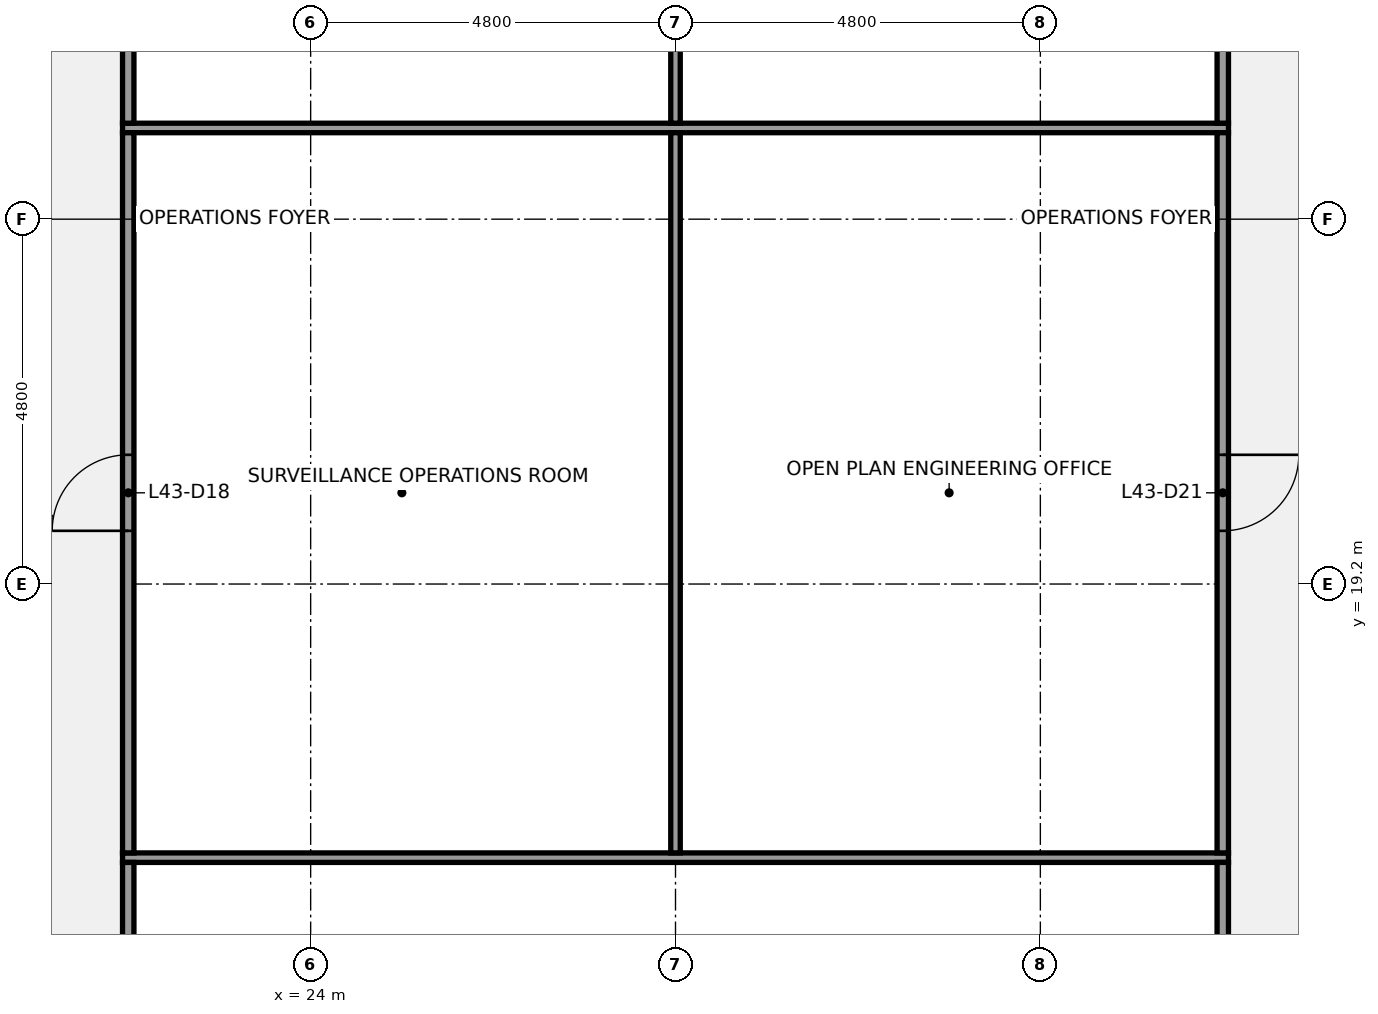
"""IFC4 building model, lengths in metres.
Left out: names, types, materials, properties, quantities, classifications, styles, units other than length and angle.
Written with IfcOpenShell. Run it as: python <this file> out.ifc"""

import sys

from ifc_helpers import new_model, si_unit, direction, frame, frame_2d, origin, place, context, subcontext, project, spatial, rectangle, extrude, element, fill, save


model = new_model("IFC4")
c1 = context("Model", 3, precision=1e-05, world=origin(), true_north=direction((0.0, 1.0)))
c2 = subcontext(c1, "Body", "Model", "MODEL_VIEW")
j1 = project(units=[si_unit("LENGTHUNIT", "METRE"), si_unit("PLANEANGLEUNIT", "RADIAN")], contexts=[c1])
p1 = place(None, origin())
s1 = spatial("IfcSite", under=j1, at=p1, CompositionType="ELEMENT")
p2 = place(p1, origin())
s2 = spatial("IfcBuilding", under=s1, at=p2, CompositionType="ELEMENT")
p3 = place(p2, frame((0.0, 0.0, 201.2)))
s3 = spatial("IfcBuildingStorey", under=s2, at=p3, CompositionType="ELEMENT", Elevation=201.2)
for number, where, z_axis, x_axis in (
    (1, (21.525, 15.6, 0.0), (0.0, 0.0, 1.0), (1.0, 0.0, 0.0)),
    (2, (21.525, 25.2, 0.0), (0.0, 0.0, 1.0), (1.0, 0.0, 0.0)),
):
    element("IfcWall", number, at=place(p3, frame(where, z_axis=z_axis, x_axis=x_axis)), inside=s3, PredefinedType="PARTITIONING", context=c2, shape_type="SweptSolid", body=[
        extrude(rectangle(XDim=14.55, YDim=0.125, at=frame_2d((7.275, 0.0))), origin(), (0.0, 0.0, 1.0), 2.87),
    ])
p4 = place(p3, frame((21.6, 10.863, 0.0), z_axis=(0.0, 0.0, 1.0), x_axis=(0.0, 1.0, 0.0)))
e3 = element("IfcWall", 3, at=p4, inside=s3, PredefinedType="PARTITIONING", context=c2, shape_type="SweptSolid", body=[
    extrude(rectangle(XDim=4.675, YDim=0.15, at=frame_2d((2.337, 0.0))), origin(), (0.0, 0.0, 1.0), 2.87),
])
p5 = place(p4, frame((1.837, 0.0, 0.0)))
e4 = element("IfcOpeningElement", 4, at=p5, cuts=e3, PredefinedType="OPENING", context=c2, shape_type="SweptSolid", body=[
    extrude(rectangle(XDim=1.0, YDim=2.1, at=frame_2d((0.5, 1.05))), frame((0.0, 0.085, 0.0), z_axis=(0.0, -1.0, 0.0), x_axis=(1.0, 0.0, 0.0)), (0.0, 0.0, 1.0), 0.17),
])
p6 = place(p3, frame((21.6, 15.663, 0.0), z_axis=(0.0, 0.0, 1.0), x_axis=(0.0, 1.0, 0.0)))
e5 = element("IfcWall", 5, at=p6, inside=s3, PredefinedType="PARTITIONING", context=c2, shape_type="SweptSolid", body=[
    extrude(rectangle(XDim=9.475, YDim=0.15, at=frame_2d((4.737, 0.0))), origin(), (0.0, 0.0, 1.0), 2.87),
])
p7 = place(p6, frame((4.238, 0.0, 0.0)))
e6 = element("IfcOpeningElement", 6, at=p7, cuts=e5, PredefinedType="OPENING", context=c2, shape_type="SweptSolid", body=[
    extrude(rectangle(XDim=1.0, YDim=2.1, at=frame_2d((0.5, 1.05))), frame((0.0, 0.085, 0.0), z_axis=(0.0, -1.0, 0.0), x_axis=(1.0, 0.0, 0.0)), (0.0, 0.0, 1.0), 0.17),
])
p8 = place(p3, frame((21.6, 25.262, 0.0), z_axis=(0.0, 0.0, 1.0), x_axis=(0.0, 1.0, 0.0)))
e7 = element("IfcWall", 7, at=p8, inside=s3, PredefinedType="PARTITIONING", context=c2, shape_type="SweptSolid", body=[
    extrude(rectangle(XDim=5.875, YDim=0.15, at=frame_2d((2.938, 0.0))), origin(), (0.0, 0.0, 1.0), 2.87),
])
p9 = place(p8, frame((2.438, 0.0, 0.0)))
e8 = element("IfcOpeningElement", 8, at=p9, cuts=e7, PredefinedType="OPENING", context=c2, shape_type="SweptSolid", body=[
    extrude(rectangle(XDim=1.0, YDim=2.1, at=frame_2d((0.5, 1.05))), frame((0.0, 0.085, 0.0), z_axis=(0.0, -1.0, 0.0), x_axis=(1.0, 0.0, 0.0)), (0.0, 0.0, 1.0), 0.17),
])
p10 = place(p3, frame((28.8, 15.663, 0.0), z_axis=(0.0, 0.0, 1.0), x_axis=(0.0, 1.0, 0.0)))
e9 = element("IfcWall", 9, at=p10, inside=s3, PredefinedType="PARTITIONING", context=c2, shape_type="SweptSolid", body=[
    extrude(rectangle(XDim=9.475, YDim=0.125, at=frame_2d((4.737, 0.0))), origin(), (0.0, 0.0, 1.0), 2.87),
])
p11 = place(p3, frame((28.8, 25.262, 0.0), z_axis=(0.0, 0.0, 1.0), x_axis=(0.0, 1.0, 0.0)))
e10 = element("IfcWall", 10, at=p11, inside=s3, PredefinedType="PARTITIONING", context=c2, shape_type="SweptSolid", body=[
    extrude(rectangle(XDim=5.875, YDim=0.125, at=frame_2d((2.938, 0.0))), origin(), (0.0, 0.0, 1.0), 2.87),
])
p12 = place(p3, frame((36.0, 10.863, 0.0), z_axis=(0.0, 0.0, 1.0), x_axis=(0.0, 1.0, 0.0)))
e11 = element("IfcWall", 11, at=p12, inside=s3, PredefinedType="PARTITIONING", context=c2, shape_type="SweptSolid", body=[
    extrude(rectangle(XDim=4.675, YDim=0.15, at=frame_2d((2.337, 0.0))), origin(), (0.0, 0.0, 1.0), 2.87),
])
p13 = place(p3, frame((36.0, 15.663, 0.0), z_axis=(0.0, 0.0, 1.0), x_axis=(0.0, 1.0, 0.0)))
e12 = element("IfcWall", 12, at=p13, inside=s3, PredefinedType="PARTITIONING", context=c2, shape_type="SweptSolid", body=[
    extrude(rectangle(XDim=9.475, YDim=0.15, at=frame_2d((4.737, 0.0))), origin(), (0.0, 0.0, 1.0), 2.87),
])
p14 = place(p13, frame((4.238, 0.0, 0.0)))
e13 = element("IfcOpeningElement", 13, at=p14, cuts=e12, PredefinedType="OPENING", context=c2, shape_type="SweptSolid", body=[
    extrude(rectangle(XDim=1.0, YDim=2.1, at=frame_2d((0.5, 1.05))), frame((0.0, 0.085, 0.0), z_axis=(0.0, -1.0, 0.0), x_axis=(1.0, 0.0, 0.0)), (0.0, 0.0, 1.0), 0.17),
])
p15 = place(p3, frame((36.0, 25.262, 0.0), z_axis=(0.0, 0.0, 1.0), x_axis=(0.0, 1.0, 0.0)))
e14 = element("IfcWall", 14, at=p15, inside=s3, PredefinedType="PARTITIONING", context=c2, shape_type="SweptSolid", body=[
    extrude(rectangle(XDim=5.875, YDim=0.15, at=frame_2d((2.938, 0.0))), origin(), (0.0, 0.0, 1.0), 2.87),
])
p16 = place(p15, frame((2.438, 0.0, 0.0)))
e15 = element("IfcOpeningElement", 15, at=p16, cuts=e14, PredefinedType="OPENING", context=c2, shape_type="SweptSolid", body=[
    extrude(rectangle(XDim=1.0, YDim=2.1, at=frame_2d((0.5, 1.05))), frame((0.0, 0.085, 0.0), z_axis=(0.0, -1.0, 0.0), x_axis=(1.0, 0.0, 0.0)), (0.0, 0.0, 1.0), 0.17),
])
p17 = place(p7, origin())
e16 = element("IfcDoor", 16, at=p17, inside=s3, OperationType="SINGLE_SWING_LEFT", PredefinedType="DOOR", context=c2, shape_type="SweptSolid", body=[
    extrude(rectangle(XDim=1.0, YDim=2.1, at=frame_2d((0.5, 1.05))), frame((0.0, 0.025, 0.0), z_axis=(0.0, -1.0, 0.0), x_axis=(1.0, 0.0, 0.0)), (0.0, 0.0, 1.0), 0.05),
])
fill(e6, e16)
p18 = place(p14, origin())
e17 = element("IfcDoor", 17, at=p18, inside=s3, OperationType="SINGLE_SWING_RIGHT", PredefinedType="DOOR", context=c2, shape_type="SweptSolid", body=[
    extrude(rectangle(XDim=1.0, YDim=2.1, at=frame_2d((0.5, 1.05))), frame((0.0, 0.025, 0.0), z_axis=(0.0, -1.0, 0.0), x_axis=(1.0, 0.0, 0.0)), (0.0, 0.0, 1.0), 0.05),
])
fill(e13, e17)
save(model, sys.argv[1])
